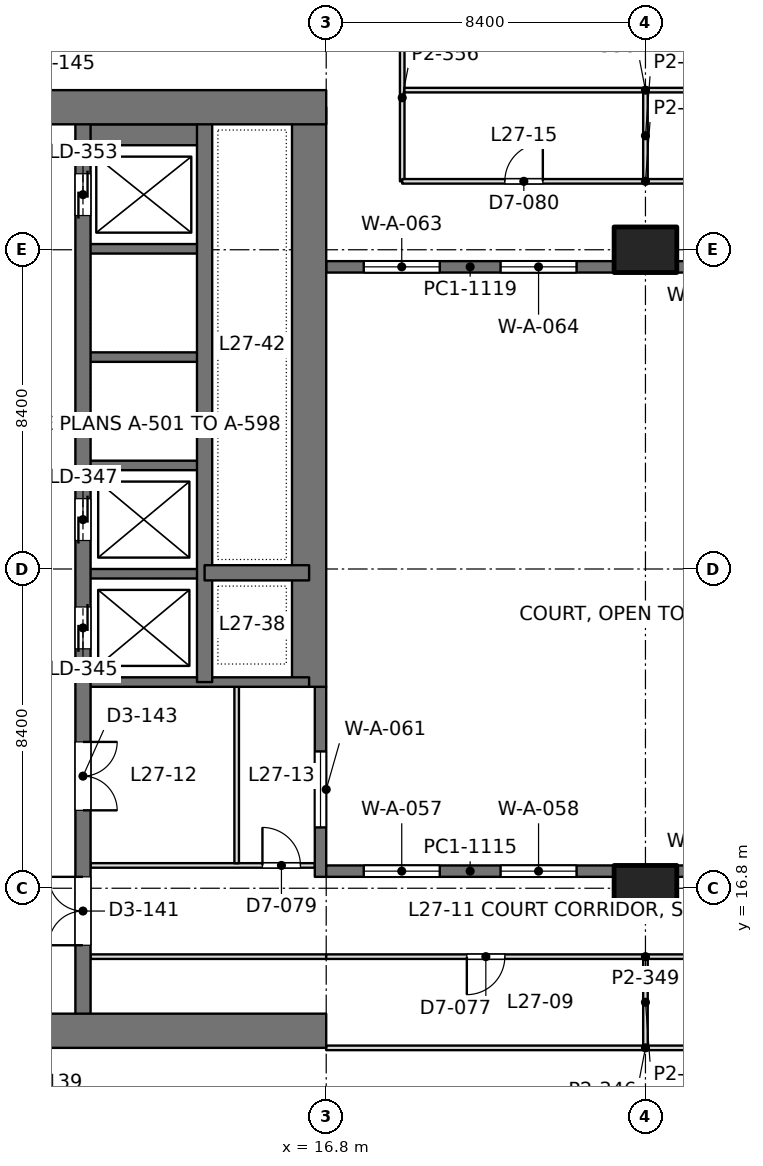
"""IFC4 building model, lengths in metres.
Left out: names, types, materials, properties, quantities, classifications, styles, units other than length and angle.
Written with IfcOpenShell. Run it as: python <this file> out.ifc"""

import sys

from ifc_helpers import new_model, si_unit, direction, frame, frame_2d, origin, origin_2d, place, context, subcontext, project, spatial, rectangle, extrude, element, fill, save


model = new_model("IFC4")
c1 = context("Model", 3, precision=1e-05, world=origin(), true_north=direction((0.0, 1.0)))
c2 = subcontext(c1, "Body", "Model", "MODEL_VIEW")
j1 = project(units=[si_unit("LENGTHUNIT", "METRE"), si_unit("PLANEANGLEUNIT", "RADIAN")], contexts=[c1])
p1 = place(None, origin())
s1 = spatial("IfcSite", under=j1, at=p1, CompositionType="ELEMENT")
p2 = place(p1, origin())
s2 = spatial("IfcBuilding", under=s1, at=p2, CompositionType="ELEMENT")
p3 = place(p2, frame((0.0, 0.0, 121.8)))
s3 = spatial("IfcBuildingStorey", under=s2, at=p3, CompositionType="ELEMENT", Elevation=121.8)
for number, where, z_axis, x_axis in (
    (1, (25.2, 16.8, 0.0), (0.0, 0.0, 1.0), (1.0, 0.0, 0.0)),
    (2, (25.2, 33.6, 0.0), (0.0, 0.0, 1.0), (1.0, 0.0, 0.0)),
):
    element("IfcColumn", number, at=place(p3, frame(where, z_axis=z_axis, x_axis=x_axis)), inside=s3, PredefinedType="COLUMN", context=c2, shape_type="SweptSolid", body=[
        extrude(rectangle(XDim=1.65, YDim=1.2, at=origin_2d()), origin(), (0.0, 0.0, 1.0), 4.2),
    ])
p4 = place(p3, frame((-1.2, 13.05, 0.0), z_axis=(0.0, 0.0, 1.0), x_axis=(1.0, 0.0, 0.0)))
e3 = element("IfcWall", 3, at=p4, inside=s3, PredefinedType="SHEAR", context=c2, shape_type="SweptSolid", body=[
    extrude(rectangle(XDim=18.0, YDim=0.9, at=frame_2d((9.0, 0.0))), origin(), (0.0, 0.0, 1.0), 4.2),
])
p5 = place(p4, frame((8.95, 0.0, 0.0)))
e4 = element("IfcOpeningElement", 4, at=p5, cuts=e3, PredefinedType="OPENING", context=c2, shape_type="SweptSolid", body=[
    extrude(rectangle(XDim=1.8, YDim=2.4, at=frame_2d((0.9, 1.2))), frame((0.0, 0.46, 0.0), z_axis=(0.0, -1.0, 0.0), x_axis=(1.0, 0.0, 0.0)), (0.0, 0.0, 1.0), 0.92),
])
p6 = place(p3, frame((-1.2, 37.35, 0.0), z_axis=(0.0, 0.0, 1.0), x_axis=(1.0, 0.0, 0.0)))
e5 = element("IfcWall", 5, at=p6, inside=s3, PredefinedType="SHEAR", context=c2, shape_type="SweptSolid", body=[
    extrude(rectangle(XDim=18.0, YDim=0.9, at=frame_2d((9.0, 0.0))), origin(), (0.0, 0.0, 1.0), 4.2),
])
p7 = place(p6, frame((8.95, 0.0, 0.0)))
e6 = element("IfcOpeningElement", 6, at=p7, cuts=e5, PredefinedType="OPENING", context=c2, shape_type="SweptSolid", body=[
    extrude(rectangle(XDim=1.8, YDim=2.4, at=frame_2d((0.9, 1.2))), frame((0.0, 0.46, 0.0), z_axis=(0.0, -1.0, 0.0), x_axis=(1.0, 0.0, 0.0)), (0.0, 0.0, 1.0), 0.92),
])
p8 = place(p3, frame((16.35, 22.1, 0.0), z_axis=(0.0, 0.0, 1.0), x_axis=(0.0, 1.0, 0.0)))
e7 = element("IfcWall", 7, at=p8, inside=s3, PredefinedType="SHEAR", context=c2, shape_type="SweptSolid", body=[
    extrude(rectangle(XDim=15.25, YDim=0.9, at=frame_2d((7.625, 0.0))), origin(), (0.0, 0.0, 1.0), 4.2),
])
p9 = place(p3, frame((10.4, 13.05, 0.0), z_axis=(0.0, 0.0, 1.0), x_axis=(0.0, 1.0, 0.0)))
e8 = element("IfcWall", 8, at=p9, inside=s3, PredefinedType="SHEAR", context=c2, shape_type="SweptSolid", body=[
    extrude(rectangle(XDim=24.3, YDim=0.4, at=frame_2d((12.15, 0.0))), origin(), (0.0, 0.0, 1.0), 4.2),
])
p10 = place(p9, frame((10.05, 0.0, 0.0)))
e9 = element("IfcOpeningElement", 9, at=p10, cuts=e8, PredefinedType="OPENING", context=c2, shape_type="SweptSolid", body=[
    extrude(rectangle(XDim=1.1, YDim=2.2, at=frame_2d((0.55, 1.1))), frame((0.0, 0.21, 0.0), z_axis=(0.0, -1.0, 0.0), x_axis=(1.0, 0.0, 0.0)), (0.0, 0.0, 1.0), 0.42),
])
p11 = place(p9, frame((12.9, 0.0, 0.0)))
e10 = element("IfcOpeningElement", 10, at=p11, cuts=e8, PredefinedType="OPENING", context=c2, shape_type="SweptSolid", body=[
    extrude(rectangle(XDim=1.1, YDim=2.2, at=frame_2d((0.55, 1.1))), frame((0.0, 0.21, 0.0), z_axis=(0.0, -1.0, 0.0), x_axis=(1.0, 0.0, 0.0)), (0.0, 0.0, 1.0), 0.42),
])
p12 = place(p9, frame((21.45, 0.0, 0.0)))
e11 = element("IfcOpeningElement", 11, at=p12, cuts=e8, PredefinedType="OPENING", context=c2, shape_type="SweptSolid", body=[
    extrude(rectangle(XDim=1.1, YDim=2.2, at=frame_2d((0.55, 1.1))), frame((0.0, 0.21, 0.0), z_axis=(0.0, -1.0, 0.0), x_axis=(1.0, 0.0, 0.0)), (0.0, 0.0, 1.0), 0.42),
])
p13 = place(p9, frame((2.25, 0.0, 0.0)))
e12 = element("IfcOpeningElement", 12, at=p13, cuts=e8, PredefinedType="OPENING", context=c2, shape_type="SweptSolid", body=[
    extrude(rectangle(XDim=1.8, YDim=2.4, at=frame_2d((0.9, 1.2))), frame((0.0, 0.21, 0.0), z_axis=(0.0, -1.0, 0.0), x_axis=(1.0, 0.0, 0.0)), (0.0, 0.0, 1.0), 0.42),
])
p14 = place(p9, frame((5.8, 0.0, 0.0)))
e13 = element("IfcOpeningElement", 13, at=p14, cuts=e8, PredefinedType="OPENING", context=c2, shape_type="SweptSolid", body=[
    extrude(rectangle(XDim=1.8, YDim=2.4, at=frame_2d((0.9, 1.2))), frame((0.0, 0.21, 0.0), z_axis=(0.0, -1.0, 0.0), x_axis=(1.0, 0.0, 0.0)), (0.0, 0.0, 1.0), 0.42),
])
p15 = place(p3, frame((13.6, 22.225, 0.0), z_axis=(0.0, 0.0, 1.0), x_axis=(0.0, 1.0, 0.0)))
e14 = element("IfcWall", 14, at=p15, inside=s3, PredefinedType="SHEAR", context=c2, shape_type="SweptSolid", body=[
    extrude(rectangle(XDim=15.125, YDim=0.4, at=frame_2d((7.562, 0.0))), origin(), (0.0, 0.0, 1.0), 4.2),
])
p16 = place(p3, frame((13.6, 25.1, 0.0), z_axis=(0.0, 0.0, 1.0), x_axis=(1.0, 0.0, 0.0)))
e15 = element("IfcWall", 15, at=p16, inside=s3, PredefinedType="SHEAR", context=c2, shape_type="SweptSolid", body=[
    extrude(rectangle(XDim=2.75, YDim=0.4, at=frame_2d((1.375, 0.0))), origin(), (0.0, 0.0, 1.0), 4.2),
])
p17 = place(p3, frame((10.4, 22.225, 0.0), z_axis=(0.0, 0.0, 1.0), x_axis=(1.0, 0.0, 0.0)))
e16 = element("IfcWall", 16, at=p17, inside=s3, PredefinedType="SHEAR", context=c2, shape_type="SweptSolid", body=[
    extrude(rectangle(XDim=5.95, YDim=0.25, at=frame_2d((2.975, 0.0))), origin(), (0.0, 0.0, 1.0), 4.2),
])
for number, where, z_axis, x_axis in (
    (17, (10.4, 25.075, 0.0), (0.0, 0.0, 1.0), (1.0, 0.0, 0.0)),
    (18, (10.4, 27.925, 0.0), (0.0, 0.0, 1.0), (1.0, 0.0, 0.0)),
    (19, (10.4, 30.775, 0.0), (0.0, 0.0, 1.0), (1.0, 0.0, 0.0)),
    (20, (10.4, 33.625, 0.0), (0.0, 0.0, 1.0), (1.0, 0.0, 0.0)),
):
    element("IfcWall", number, at=place(p3, frame(where, z_axis=z_axis, x_axis=x_axis)), inside=s3, PredefinedType="SHEAR", context=c2, shape_type="SweptSolid", body=[
        extrude(rectangle(XDim=3.2, YDim=0.25, at=frame_2d((1.6, 0.0))), origin(), (0.0, 0.0, 1.0), 4.2),
    ])
p18 = place(p3, frame((10.4, 36.625, 0.0), z_axis=(0.0, 0.0, 1.0), x_axis=(1.0, 0.0, 0.0)))
e21 = element("IfcWall", 21, at=p18, inside=s3, PredefinedType="SHEAR", context=c2, shape_type="SweptSolid", body=[
    extrude(rectangle(XDim=3.2, YDim=0.55, at=frame_2d((1.6, 0.0))), origin(), (0.0, 0.0, 1.0), 4.2),
])
p19 = place(p3, frame((16.65, 17.1, 0.0), z_axis=(0.0, 0.0, 1.0), x_axis=(0.0, 1.0, 0.0)))
e22 = element("IfcWall", 22, at=p19, inside=s3, PredefinedType="SOLIDWALL", context=c2, shape_type="SweptSolid", body=[
    extrude(rectangle(XDim=5.0, YDim=0.3, at=frame_2d((2.5, 0.0))), origin(), (0.0, 0.0, 1.0), 4.05),
])
p20 = place(p19, frame((1.3, 0.0, 0.1)))
e23 = element("IfcOpeningElement", 23, at=p20, cuts=e22, PredefinedType="OPENING", context=c2, shape_type="SweptSolid", body=[
    extrude(rectangle(XDim=2.0, YDim=3.0, at=frame_2d((1.0, 1.5))), frame((0.0, 0.16, 0.0), z_axis=(0.0, -1.0, 0.0), x_axis=(1.0, 0.0, 0.0)), (0.0, 0.0, 1.0), 0.32),
])
p21 = place(p3, frame((16.8, 17.25, 0.0), z_axis=(0.0, 0.0, 1.0), x_axis=(1.0, 0.0, 0.0)))
e24 = element("IfcWall", 24, at=p21, inside=s3, PredefinedType="SOLIDWALL", context=c2, shape_type="SweptSolid", body=[
    extrude(rectangle(XDim=7.575, YDim=0.3, at=frame_2d((3.788, 0.0))), origin(), (0.0, 0.0, 1.0), 4.05),
])
p22 = place(p21, frame((0.988, 0.0, 0.1)))
e25 = element("IfcOpeningElement", 25, at=p22, cuts=e24, PredefinedType="OPENING", context=c2, shape_type="SweptSolid", body=[
    extrude(rectangle(XDim=2.0, YDim=3.0, at=frame_2d((1.0, 1.5))), frame((0.0, 0.16, 0.0), z_axis=(0.0, -1.0, 0.0), x_axis=(1.0, 0.0, 0.0)), (0.0, 0.0, 1.0), 0.32),
])
p23 = place(p21, frame((4.587, 0.0, 0.1)))
e26 = element("IfcOpeningElement", 26, at=p23, cuts=e24, PredefinedType="OPENING", context=c2, shape_type="SweptSolid", body=[
    extrude(rectangle(XDim=2.0, YDim=3.0, at=frame_2d((1.0, 1.5))), frame((0.0, 0.16, 0.0), z_axis=(0.0, -1.0, 0.0), x_axis=(1.0, 0.0, 0.0)), (0.0, 0.0, 1.0), 0.32),
])
p24 = place(p3, frame((26.025, 17.25, 0.0), z_axis=(0.0, 0.0, 1.0), x_axis=(1.0, 0.0, 0.0)))
e27 = element("IfcWall", 27, at=p24, inside=s3, PredefinedType="SOLIDWALL", context=c2, shape_type="SweptSolid", body=[
    extrude(rectangle(XDim=7.575, YDim=0.3, at=frame_2d((3.788, 0.0))), origin(), (0.0, 0.0, 1.0), 4.05),
])
p25 = place(p24, frame((0.587, 0.0, 0.1)))
e28 = element("IfcOpeningElement", 28, at=p25, cuts=e27, PredefinedType="OPENING", context=c2, shape_type="SweptSolid", body=[
    extrude(rectangle(XDim=2.0, YDim=3.0, at=frame_2d((1.0, 1.5))), frame((0.0, 0.16, 0.0), z_axis=(0.0, -1.0, 0.0), x_axis=(1.0, 0.0, 0.0)), (0.0, 0.0, 1.0), 0.32),
])
p26 = place(p24, frame((4.188, 0.0, 0.1)))
e29 = element("IfcOpeningElement", 29, at=p26, cuts=e27, PredefinedType="OPENING", context=c2, shape_type="SweptSolid", body=[
    extrude(rectangle(XDim=2.0, YDim=3.0, at=frame_2d((1.0, 1.5))), frame((0.0, 0.16, 0.0), z_axis=(0.0, -1.0, 0.0), x_axis=(1.0, 0.0, 0.0)), (0.0, 0.0, 1.0), 0.32),
])
p27 = place(p3, frame((16.8, 33.15, 0.0), z_axis=(0.0, 0.0, 1.0), x_axis=(1.0, 0.0, 0.0)))
e30 = element("IfcWall", 30, at=p27, inside=s3, PredefinedType="SOLIDWALL", context=c2, shape_type="SweptSolid", body=[
    extrude(rectangle(XDim=7.575, YDim=0.3, at=frame_2d((3.788, 0.0))), origin(), (0.0, 0.0, 1.0), 4.05),
])
p28 = place(p27, frame((0.988, 0.0, 0.1)))
e31 = element("IfcOpeningElement", 31, at=p28, cuts=e30, PredefinedType="OPENING", context=c2, shape_type="SweptSolid", body=[
    extrude(rectangle(XDim=2.0, YDim=3.0, at=frame_2d((1.0, 1.5))), frame((0.0, 0.16, 0.0), z_axis=(0.0, -1.0, 0.0), x_axis=(1.0, 0.0, 0.0)), (0.0, 0.0, 1.0), 0.32),
])
p29 = place(p27, frame((4.587, 0.0, 0.1)))
e32 = element("IfcOpeningElement", 32, at=p29, cuts=e30, PredefinedType="OPENING", context=c2, shape_type="SweptSolid", body=[
    extrude(rectangle(XDim=2.0, YDim=3.0, at=frame_2d((1.0, 1.5))), frame((0.0, 0.16, 0.0), z_axis=(0.0, -1.0, 0.0), x_axis=(1.0, 0.0, 0.0)), (0.0, 0.0, 1.0), 0.32),
])
p30 = place(p3, frame((26.025, 33.15, 0.0), z_axis=(0.0, 0.0, 1.0), x_axis=(1.0, 0.0, 0.0)))
e33 = element("IfcWall", 33, at=p30, inside=s3, PredefinedType="SOLIDWALL", context=c2, shape_type="SweptSolid", body=[
    extrude(rectangle(XDim=7.575, YDim=0.3, at=frame_2d((3.788, 0.0))), origin(), (0.0, 0.0, 1.0), 4.05),
])
p31 = place(p30, frame((0.587, 0.0, 0.1)))
e34 = element("IfcOpeningElement", 34, at=p31, cuts=e33, PredefinedType="OPENING", context=c2, shape_type="SweptSolid", body=[
    extrude(rectangle(XDim=2.0, YDim=3.0, at=frame_2d((1.0, 1.5))), frame((0.0, 0.16, 0.0), z_axis=(0.0, -1.0, 0.0), x_axis=(1.0, 0.0, 0.0)), (0.0, 0.0, 1.0), 0.32),
])
p32 = place(p30, frame((4.188, 0.0, 0.1)))
e35 = element("IfcOpeningElement", 35, at=p32, cuts=e33, PredefinedType="OPENING", context=c2, shape_type="SweptSolid", body=[
    extrude(rectangle(XDim=2.0, YDim=3.0, at=frame_2d((1.0, 1.5))), frame((0.0, 0.16, 0.0), z_axis=(0.0, -1.0, 0.0), x_axis=(1.0, 0.0, 0.0)), (0.0, 0.0, 1.0), 0.32),
])
p33 = place(p3, frame((10.598, 17.4, 0.0), z_axis=(0.0, 0.0, 1.0), x_axis=(1.0, 0.0, 0.0)))
e36 = element("IfcWall", 36, at=p33, inside=s3, PredefinedType="PARTITIONING", context=c2, shape_type="SweptSolid", body=[
    extrude(rectangle(XDim=5.904, YDim=0.12, at=frame_2d((2.952, 0.0))), origin(), (0.0, 0.0, 1.0), 3.55),
])
p34 = place(p33, frame((4.524, 0.0, 0.0)))
e37 = element("IfcOpeningElement", 37, at=p34, cuts=e36, PredefinedType="OPENING", context=c2, shape_type="SweptSolid", body=[
    extrude(rectangle(XDim=1.0, YDim=2.4, at=frame_2d((0.5, 1.2))), frame((0.0, 0.07, 0.0), z_axis=(0.0, -1.0, 0.0), x_axis=(1.0, 0.0, 0.0)), (0.0, 0.0, 1.0), 0.14),
])
p35 = place(p3, frame((14.444, 17.458, 0.0), z_axis=(0.0, 0.0, 1.0), x_axis=(0.0, 1.0, 0.0)))
e38 = element("IfcWall", 38, at=p35, inside=s3, PredefinedType="PARTITIONING", context=c2, shape_type="SweptSolid", body=[
    extrude(rectangle(XDim=4.644, YDim=0.12, at=frame_2d((2.322, 0.0))), origin(), (0.0, 0.0, 1.0), 3.6),
])
p36 = place(p3, frame((10.598, 15.0, 0.0), z_axis=(0.0, 0.0, 1.0), x_axis=(1.0, 0.0, 0.0)))
e39 = element("IfcWall", 39, at=p36, inside=s3, PredefinedType="PARTITIONING", context=c2, shape_type="SweptSolid", body=[
    extrude(rectangle(XDim=6.204, YDim=0.12, at=frame_2d((3.102, 0.0))), origin(), (0.0, 0.0, 1.0), 3.55),
])
p37 = place(p3, frame((25.2, 12.658, 0.0), z_axis=(0.0, 0.0, 1.0), x_axis=(0.0, 1.0, 0.0)))
e40 = element("IfcWall", 40, at=p37, inside=s3, PredefinedType="PARTITIONING", context=c2, shape_type="SweptSolid", body=[
    extrude(rectangle(XDim=2.284, YDim=0.12, at=frame_2d((1.142, 0.0))), origin(), (0.0, 0.0, 1.0), 3.55),
])
p38 = place(p3, frame((16.798, 15.0, 0.0), z_axis=(0.0, 0.0, 1.0), x_axis=(1.0, 0.0, 0.0)))
e41 = element("IfcWall", 41, at=p38, inside=s3, PredefinedType="PARTITIONING", context=c2, shape_type="SweptSolid", body=[
    extrude(rectangle(XDim=16.804, YDim=0.12, at=frame_2d((8.402, 0.0))), origin(), (0.0, 0.0, 1.0), 3.55),
])
p39 = place(p38, frame((3.702, 0.0, 0.0)))
e42 = element("IfcOpeningElement", 42, at=p39, cuts=e41, PredefinedType="OPENING", context=c2, shape_type="SweptSolid", body=[
    extrude(rectangle(XDim=1.0, YDim=2.4, at=frame_2d((0.5, 1.2))), frame((0.0, 0.07, 0.0), z_axis=(0.0, -1.0, 0.0), x_axis=(1.0, 0.0, 0.0)), (0.0, 0.0, 1.0), 0.14),
])
p40 = place(p38, frame((12.102, 0.0, 0.0)))
e43 = element("IfcOpeningElement", 43, at=p40, cuts=e41, PredefinedType="OPENING", context=c2, shape_type="SweptSolid", body=[
    extrude(rectangle(XDim=1.0, YDim=2.4, at=frame_2d((0.5, 1.2))), frame((0.0, 0.07, 0.0), z_axis=(0.0, -1.0, 0.0), x_axis=(1.0, 0.0, 0.0)), (0.0, 0.0, 1.0), 0.14),
])
p41 = place(p3, frame((16.8, 12.6, 0.0), z_axis=(0.0, 0.0, 1.0), x_axis=(1.0, 0.0, 0.0)))
e44 = element("IfcWall", 44, at=p41, inside=s3, PredefinedType="PARTITIONING", context=c2, shape_type="SweptSolid", body=[
    extrude(rectangle(XDim=16.8, YDim=0.12, at=frame_2d((8.4, 0.0))), origin(), (0.0, 0.0, 1.0), 3.55),
])
p42 = place(p3, frame((18.8, 35.4, 0.0), z_axis=(0.0, 0.0, 1.0), x_axis=(0.0, 1.0, 0.0)))
e45 = element("IfcWall", 45, at=p42, inside=s3, PredefinedType="PARTITIONING", context=c2, shape_type="SweptSolid", body=[
    extrude(rectangle(XDim=4.4, YDim=0.12, at=frame_2d((2.2, 0.0))), origin(), (0.0, 0.0, 1.0), 4.05),
])
p43 = place(p3, frame((25.2, 35.458, 0.0), z_axis=(0.0, 0.0, 1.0), x_axis=(0.0, 1.0, 0.0)))
e46 = element("IfcWall", 46, at=p43, inside=s3, PredefinedType="PARTITIONING", context=c2, shape_type="SweptSolid", body=[
    extrude(rectangle(XDim=2.284, YDim=0.12, at=frame_2d((1.142, 0.0))), origin(), (0.0, 0.0, 1.0), 3.55),
])
p44 = place(p3, frame((18.8, 35.4, 0.0), z_axis=(0.0, 0.0, 1.0), x_axis=(1.0, 0.0, 0.0)))
e47 = element("IfcWall", 47, at=p44, inside=s3, PredefinedType="PARTITIONING", context=c2, shape_type="SweptSolid", body=[
    extrude(rectangle(XDim=12.8, YDim=0.12, at=frame_2d((6.4, 0.0))), origin(), (0.0, 0.0, 1.0), 3.55),
])
p45 = place(p44, frame((2.7, 0.0, 0.0)))
e48 = element("IfcOpeningElement", 48, at=p45, cuts=e47, PredefinedType="OPENING", context=c2, shape_type="SweptSolid", body=[
    extrude(rectangle(XDim=1.0, YDim=2.4, at=frame_2d((0.5, 1.2))), frame((0.0, 0.07, 0.0), z_axis=(0.0, -1.0, 0.0), x_axis=(1.0, 0.0, 0.0)), (0.0, 0.0, 1.0), 0.14),
])
p46 = place(p44, frame((9.1, 0.0, 0.0)))
e49 = element("IfcOpeningElement", 49, at=p46, cuts=e47, PredefinedType="OPENING", context=c2, shape_type="SweptSolid", body=[
    extrude(rectangle(XDim=1.0, YDim=2.4, at=frame_2d((0.5, 1.2))), frame((0.0, 0.07, 0.0), z_axis=(0.0, -1.0, 0.0), x_axis=(1.0, 0.0, 0.0)), (0.0, 0.0, 1.0), 0.14),
])
p47 = place(p3, frame((18.858, 37.8, 0.0), z_axis=(0.0, 0.0, 1.0), x_axis=(1.0, 0.0, 0.0)))
e50 = element("IfcWall", 50, at=p47, inside=s3, PredefinedType="PARTITIONING", context=c2, shape_type="SweptSolid", body=[
    extrude(rectangle(XDim=12.684, YDim=0.12, at=frame_2d((6.342, 0.0))), origin(), (0.0, 0.0, 1.0), 3.55),
])
p48 = place(p20, origin())
e51 = element("IfcWindow", 51, at=p48, inside=s3, PartitioningType="SINGLE_PANEL", PredefinedType="WINDOW", context=c2, shape_type="SweptSolid", body=[
    extrude(rectangle(XDim=2.0, YDim=3.0, at=frame_2d((1.0, 1.5))), frame((0.0, 0.03, 0.0), z_axis=(0.0, -1.0, 0.0), x_axis=(1.0, 0.0, 0.0)), (0.0, 0.0, 1.0), 0.06),
])
fill(e23, e51)
p49 = place(p22, origin())
e52 = element("IfcWindow", 52, at=p49, inside=s3, PartitioningType="SINGLE_PANEL", PredefinedType="WINDOW", context=c2, shape_type="SweptSolid", body=[
    extrude(rectangle(XDim=2.0, YDim=3.0, at=frame_2d((1.0, 1.5))), frame((0.0, 0.03, 0.0), z_axis=(0.0, -1.0, 0.0), x_axis=(1.0, 0.0, 0.0)), (0.0, 0.0, 1.0), 0.06),
])
fill(e25, e52)
p50 = place(p23, origin())
e53 = element("IfcWindow", 53, at=p50, inside=s3, PartitioningType="SINGLE_PANEL", PredefinedType="WINDOW", context=c2, shape_type="SweptSolid", body=[
    extrude(rectangle(XDim=2.0, YDim=3.0, at=frame_2d((1.0, 1.5))), frame((0.0, 0.03, 0.0), z_axis=(0.0, -1.0, 0.0), x_axis=(1.0, 0.0, 0.0)), (0.0, 0.0, 1.0), 0.06),
])
fill(e26, e53)
p51 = place(p28, origin())
e54 = element("IfcWindow", 54, at=p51, inside=s3, PartitioningType="SINGLE_PANEL", PredefinedType="WINDOW", context=c2, shape_type="SweptSolid", body=[
    extrude(rectangle(XDim=2.0, YDim=3.0, at=frame_2d((1.0, 1.5))), frame((0.0, 0.03, 0.0), z_axis=(0.0, -1.0, 0.0), x_axis=(1.0, 0.0, 0.0)), (0.0, 0.0, 1.0), 0.06),
])
fill(e31, e54)
p52 = place(p29, origin())
e55 = element("IfcWindow", 55, at=p52, inside=s3, PartitioningType="SINGLE_PANEL", PredefinedType="WINDOW", context=c2, shape_type="SweptSolid", body=[
    extrude(rectangle(XDim=2.0, YDim=3.0, at=frame_2d((1.0, 1.5))), frame((0.0, 0.03, 0.0), z_axis=(0.0, -1.0, 0.0), x_axis=(1.0, 0.0, 0.0)), (0.0, 0.0, 1.0), 0.06),
])
fill(e32, e55)
p53 = place(p10, origin())
e56 = element("IfcDoor", 56, at=p53, inside=s3, OperationType="DOUBLE_DOOR_SLIDING", PredefinedType="DOOR", context=c2, shape_type="SweptSolid", body=[
    extrude(rectangle(XDim=1.1, YDim=2.2, at=frame_2d((0.55, 1.1))), frame((0.0, 0.025, 0.0), z_axis=(0.0, -1.0, 0.0), x_axis=(1.0, 0.0, 0.0)), (0.0, 0.0, 1.0), 0.05),
])
fill(e9, e56)
p54 = place(p11, origin())
e57 = element("IfcDoor", 57, at=p54, inside=s3, OperationType="DOUBLE_DOOR_SLIDING", PredefinedType="DOOR", context=c2, shape_type="SweptSolid", body=[
    extrude(rectangle(XDim=1.1, YDim=2.2, at=frame_2d((0.55, 1.1))), frame((0.0, 0.025, 0.0), z_axis=(0.0, -1.0, 0.0), x_axis=(1.0, 0.0, 0.0)), (0.0, 0.0, 1.0), 0.05),
])
fill(e10, e57)
p55 = place(p12, origin())
e58 = element("IfcDoor", 58, at=p55, inside=s3, OperationType="DOUBLE_DOOR_SLIDING", PredefinedType="DOOR", context=c2, shape_type="SweptSolid", body=[
    extrude(rectangle(XDim=1.1, YDim=2.2, at=frame_2d((0.55, 1.1))), frame((0.0, 0.025, 0.0), z_axis=(0.0, -1.0, 0.0), x_axis=(1.0, 0.0, 0.0)), (0.0, 0.0, 1.0), 0.05),
])
fill(e11, e58)
p56 = place(p13, origin())
e59 = element("IfcDoor", 59, at=p56, inside=s3, OperationType="DOUBLE_DOOR_SINGLE_SWING", PredefinedType="DOOR", context=c2, shape_type="SweptSolid", body=[
    extrude(rectangle(XDim=1.8, YDim=2.4, at=frame_2d((0.9, 1.2))), frame((0.0, 0.025, 0.0), z_axis=(0.0, -1.0, 0.0), x_axis=(1.0, 0.0, 0.0)), (0.0, 0.0, 1.0), 0.05),
])
fill(e12, e59)
p57 = place(p14, frame((1.8, 0.0, 0.0), z_axis=(0.0, 0.0, 1.0), x_axis=(-1.0, 0.0, 0.0)))
e60 = element("IfcDoor", 60, at=p57, inside=s3, OperationType="DOUBLE_DOOR_SINGLE_SWING", PredefinedType="DOOR", context=c2, shape_type="SweptSolid", body=[
    extrude(rectangle(XDim=1.8, YDim=2.4, at=frame_2d((0.9, 1.2))), frame((0.0, 0.025, 0.0), z_axis=(0.0, -1.0, 0.0), x_axis=(1.0, 0.0, 0.0)), (0.0, 0.0, 1.0), 0.05),
])
fill(e13, e60)
p58 = place(p34, origin())
e61 = element("IfcDoor", 61, at=p58, inside=s3, OperationType="SINGLE_SWING_LEFT", PredefinedType="DOOR", context=c2, shape_type="SweptSolid", body=[
    extrude(rectangle(XDim=1.0, YDim=2.4, at=frame_2d((0.5, 1.2))), frame((0.0, 0.025, 0.0), z_axis=(0.0, -1.0, 0.0), x_axis=(1.0, 0.0, 0.0)), (0.0, 0.0, 1.0), 0.05),
])
fill(e37, e61)
p59 = place(p39, frame((1.0, 0.0, 0.0), z_axis=(0.0, 0.0, 1.0), x_axis=(-1.0, 0.0, 0.0)))
e62 = element("IfcDoor", 62, at=p59, inside=s3, OperationType="SINGLE_SWING_RIGHT", PredefinedType="DOOR", context=c2, shape_type="SweptSolid", body=[
    extrude(rectangle(XDim=1.0, YDim=2.4, at=frame_2d((0.5, 1.2))), frame((0.0, 0.025, 0.0), z_axis=(0.0, -1.0, 0.0), x_axis=(1.0, 0.0, 0.0)), (0.0, 0.0, 1.0), 0.05),
])
fill(e42, e62)
p60 = place(p45, origin())
e63 = element("IfcDoor", 63, at=p60, inside=s3, OperationType="SINGLE_SWING_RIGHT", PredefinedType="DOOR", context=c2, shape_type="SweptSolid", body=[
    extrude(rectangle(XDim=1.0, YDim=2.4, at=frame_2d((0.5, 1.2))), frame((0.0, 0.025, 0.0), z_axis=(0.0, -1.0, 0.0), x_axis=(1.0, 0.0, 0.0)), (0.0, 0.0, 1.0), 0.05),
])
fill(e48, e63)
save(model, sys.argv[1])
